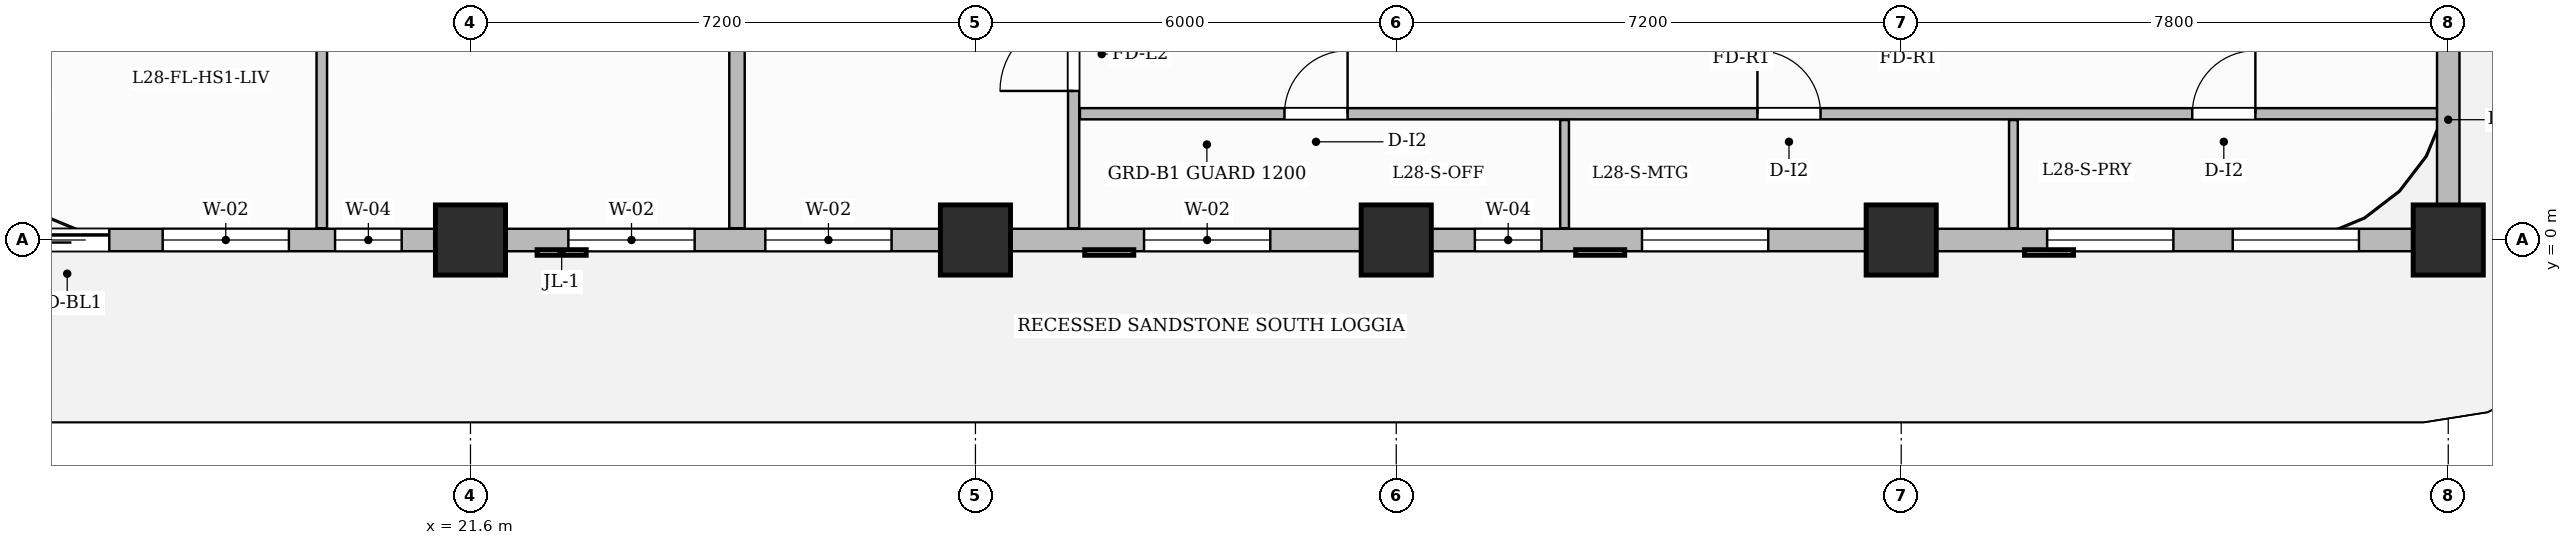
"""IFC4 building model, lengths in metres.
Left out: names, types, materials, properties, quantities, classifications, styles, units other than length and angle.
Written with IfcOpenShell. Run it as: python <this file> out.ifc"""

import sys

from ifc_helpers import new_model, si_unit, direction, frame, frame_2d, origin, origin_2d, place, context, subcontext, project, spatial, rectangle, extrude, source, transform, mapped, element, fill, save


model = new_model("IFC4")
c1 = context("Model", 3, precision=1e-05, world=origin(), true_north=direction((0.0, 1.0)))
c2 = subcontext(c1, "Body", "Model", "MODEL_VIEW")
j1 = project(units=[si_unit("LENGTHUNIT", "METRE"), si_unit("PLANEANGLEUNIT", "RADIAN")], contexts=[c1])
p1 = place(None, origin())
s1 = spatial("IfcSite", under=j1, at=p1, CompositionType="ELEMENT")
p2 = place(p1, origin())
s2 = spatial("IfcBuilding", under=s1, at=p2, CompositionType="ELEMENT")
p3 = place(p2, frame((0.0, 0.0, 115.5)))
s3 = spatial("IfcBuildingStorey", under=s2, at=p3, CompositionType="ELEMENT", Elevation=115.5)
m1 = source(origin(), c2, "Body", "SweptSolid", [
    extrude(rectangle(XDim=1.0, YDim=1.0, at=origin_2d()), origin(), (0.0, 0.0, 1.0), 3.7),
])
for number, where, z_axis, x_axis in (
    (1, (21.6, 0.0, 0.0), (0.0, 0.0, 1.0), (1.0, 0.0, 0.0)),
    (2, (28.8, 0.0, 0.0), (0.0, 0.0, 1.0), (1.0, 0.0, 0.0)),
    (3, (34.8, 0.0, 0.0), (0.0, 0.0, 1.0), (1.0, 0.0, 0.0)),
    (4, (42.0, 0.0, 0.0), (0.0, 0.0, 1.0), (1.0, 0.0, 0.0)),
    (5, (49.8, 0.0, 0.0), (0.0, 0.0, 1.0), (1.0, 0.0, 0.0)),
):
    element("IfcColumn", number, at=place(p3, frame(where, z_axis=z_axis, x_axis=x_axis)), inside=s3, PredefinedType="COLUMN", context=c2, shape_type="MappedRepresentation", body=[
        mapped(m1, transform((0.0, 0.0, 0.0), scale=1.0)),
    ])
p4 = place(p3, frame((30.2, 0.168, 0.0), z_axis=(0.0, 0.0, 1.0), x_axis=(0.0, 1.0, 0.0)))
e6 = element("IfcWall", 6, at=p4, inside=s3, PredefinedType="PARTITIONING", context=c2, shape_type="SweptSolid", body=[
    extrude(rectangle(XDim=9.492, YDim=0.16, at=frame_2d((4.746, 0.0))), origin(), (0.0, 0.0, 1.0), 3.45),
])
p5 = place(p4, frame((1.957, 0.0, 0.0)))
e7 = element("IfcOpeningElement", 7, at=p5, cuts=e6, PredefinedType="OPENING", context=c2, shape_type="SweptSolid", body=[
    extrude(rectangle(XDim=1.05, YDim=2.15, at=frame_2d((0.525, 1.075))), frame((0.0, 0.09, 0.0), z_axis=(0.0, -1.0, 0.0), x_axis=(1.0, 0.0, 0.0)), (0.0, 0.0, 1.0), 0.18),
])
p6 = place(p3, frame((30.29, 1.8, 0.0), z_axis=(0.0, 0.0, 1.0), x_axis=(1.0, 0.0, 0.0)))
e8 = element("IfcWall", 8, at=p6, inside=s3, PredefinedType="PARTITIONING", context=c2, shape_type="SweptSolid", body=[
    extrude(rectangle(XDim=19.37, YDim=0.16, at=frame_2d((9.685, 0.0))), origin(), (0.0, 0.0, 1.0), 3.45),
])
p7 = place(p6, frame((2.916, 0.0, 0.0)))
e9 = element("IfcOpeningElement", 9, at=p7, cuts=e8, PredefinedType="OPENING", context=c2, shape_type="SweptSolid", body=[
    extrude(rectangle(XDim=0.9, YDim=2.15, at=frame_2d((0.45, 1.075))), frame((0.0, 0.09, 0.0), z_axis=(0.0, -1.0, 0.0), x_axis=(1.0, 0.0, 0.0)), (0.0, 0.0, 1.0), 0.18),
])
p8 = place(p6, frame((9.66, 0.0, 0.0)))
e10 = element("IfcOpeningElement", 10, at=p8, cuts=e8, PredefinedType="OPENING", context=c2, shape_type="SweptSolid", body=[
    extrude(rectangle(XDim=0.9, YDim=2.15, at=frame_2d((0.45, 1.075))), frame((0.0, 0.09, 0.0), z_axis=(0.0, -1.0, 0.0), x_axis=(1.0, 0.0, 0.0)), (0.0, 0.0, 1.0), 0.18),
])
p9 = place(p6, frame((15.86, 0.0, 0.0)))
e11 = element("IfcOpeningElement", 11, at=p9, cuts=e8, PredefinedType="OPENING", context=c2, shape_type="SweptSolid", body=[
    extrude(rectangle(XDim=0.9, YDim=2.15, at=frame_2d((0.45, 1.075))), frame((0.0, 0.09, 0.0), z_axis=(0.0, -1.0, 0.0), x_axis=(1.0, 0.0, 0.0)), (0.0, 0.0, 1.0), 0.18),
])
for number, where, z_axis, x_axis in (
    (12, (37.2, 0.168, 0.0), (0.0, 0.0, 1.0), (0.0, 1.0, 0.0)),
    (13, (43.6, 0.168, 0.0), (0.0, 0.0, 1.0), (0.0, 1.0, 0.0)),
):
    element("IfcWall", number, at=place(p3, frame(where, z_axis=z_axis, x_axis=x_axis)), inside=s3, PredefinedType="PARTITIONING", context=c2, shape_type="SweptSolid", body=[
        extrude(rectangle(XDim=1.542, YDim=0.125, at=frame_2d((0.771, 0.0))), origin(), (0.0, 0.0, 1.0), 3.45),
    ])
p10 = place(p3, frame((25.4, 0.168, 0.0), z_axis=(0.0, 0.0, 1.0), x_axis=(0.0, 1.0, 0.0)))
e14 = element("IfcWall", 14, at=p10, inside=s3, PredefinedType="PARTITIONING", context=c2, shape_type="SweptSolid", body=[
    extrude(rectangle(XDim=9.492, YDim=0.22, at=frame_2d((4.746, 0.0))), origin(), (0.0, 0.0, 1.0), 3.105),
])
p11 = place(p3, frame((19.48, 0.168, 0.0), z_axis=(0.0, 0.0, 1.0), x_axis=(0.0, 1.0, 0.0)))
e15 = element("IfcWall", 15, at=p11, inside=s3, PredefinedType="PARTITIONING", context=c2, shape_type="SweptSolid", body=[
    extrude(rectangle(XDim=9.492, YDim=0.15, at=frame_2d((4.746, 0.0))), origin(), (0.0, 0.0, 1.0), 3.45),
])
p12 = place(p11, frame((8.057, 0.0, 0.0)))
e16 = element("IfcOpeningElement", 16, at=p12, cuts=e15, PredefinedType="OPENING", context=c2, shape_type="SweptSolid", body=[
    extrude(rectangle(XDim=0.9, YDim=2.15, at=frame_2d((0.45, 1.075))), frame((0.0, 0.085, 0.0), z_axis=(0.0, -1.0, 0.0), x_axis=(1.0, 0.0, 0.0)), (0.0, 0.0, 1.0), 0.17),
])
p13 = place(p3, frame((14.4, 0.0, 0.0), z_axis=(0.0, 0.0, 1.0), x_axis=(1.0, 0.0, 0.0)))
e17 = element("IfcWall", 17, at=p13, inside=s3, PredefinedType="SOLIDWALL", context=c2, shape_type="SweptSolid", body=[
    extrude(rectangle(XDim=35.4, YDim=0.32, at=frame_2d((17.7, 0.0))), origin(), (0.0, 0.0, 1.0), 2.935),
])
p14 = place(p13, frame((0.85, 0.0, 0.0)))
e18 = element("IfcOpeningElement", 18, at=p14, cuts=e17, PredefinedType="OPENING", context=c2, shape_type="SweptSolid", body=[
    extrude(rectangle(XDim=1.2, YDim=2.2, at=frame_2d((0.6, 1.1))), frame((0.0, 0.17, 0.0), z_axis=(0.0, -1.0, 0.0), x_axis=(1.0, 0.0, 0.0)), (0.0, 0.0, 1.0), 0.34),
])
p15 = place(p13, frame((2.811, 0.0, 0.8)))
e19 = element("IfcOpeningElement", 19, at=p15, cuts=e17, PredefinedType="OPENING", context=c2, shape_type="SweptSolid", body=[
    extrude(rectangle(XDim=1.8, YDim=1.85, at=frame_2d((0.9, 0.925))), frame((0.0, 0.17, 0.0), z_axis=(0.0, -1.0, 0.0), x_axis=(1.0, 0.0, 0.0)), (0.0, 0.0, 1.0), 0.34),
])
p16 = place(p13, frame((5.269, 0.0, 0.8)))
e20 = element("IfcOpeningElement", 20, at=p16, cuts=e17, PredefinedType="OPENING", context=c2, shape_type="SweptSolid", body=[
    extrude(rectangle(XDim=0.95, YDim=1.75, at=frame_2d((0.475, 0.875))), frame((0.0, 0.17, 0.0), z_axis=(0.0, -1.0, 0.0), x_axis=(1.0, 0.0, 0.0)), (0.0, 0.0, 1.0), 0.34),
])
p17 = place(p13, frame((8.596, 0.0, 0.8)))
e21 = element("IfcOpeningElement", 21, at=p17, cuts=e17, PredefinedType="OPENING", context=c2, shape_type="SweptSolid", body=[
    extrude(rectangle(XDim=1.8, YDim=1.85, at=frame_2d((0.9, 0.925))), frame((0.0, 0.17, 0.0), z_axis=(0.0, -1.0, 0.0), x_axis=(1.0, 0.0, 0.0)), (0.0, 0.0, 1.0), 0.34),
])
p18 = place(p13, frame((11.404, 0.0, 0.8)))
e22 = element("IfcOpeningElement", 22, at=p18, cuts=e17, PredefinedType="OPENING", context=c2, shape_type="SweptSolid", body=[
    extrude(rectangle(XDim=1.8, YDim=1.85, at=frame_2d((0.9, 0.925))), frame((0.0, 0.17, 0.0), z_axis=(0.0, -1.0, 0.0), x_axis=(1.0, 0.0, 0.0)), (0.0, 0.0, 1.0), 0.34),
])
p19 = place(p13, frame((16.804, 0.0, 0.8)))
e23 = element("IfcOpeningElement", 23, at=p19, cuts=e17, PredefinedType="OPENING", context=c2, shape_type="SweptSolid", body=[
    extrude(rectangle(XDim=1.8, YDim=1.85, at=frame_2d((0.9, 0.925))), frame((0.0, 0.17, 0.0), z_axis=(0.0, -1.0, 0.0), x_axis=(1.0, 0.0, 0.0)), (0.0, 0.0, 1.0), 0.34),
])
p20 = place(p13, frame((21.521, 0.0, 0.8)))
e24 = element("IfcOpeningElement", 24, at=p20, cuts=e17, PredefinedType="OPENING", context=c2, shape_type="SweptSolid", body=[
    extrude(rectangle(XDim=0.95, YDim=1.75, at=frame_2d((0.475, 0.875))), frame((0.0, 0.17, 0.0), z_axis=(0.0, -1.0, 0.0), x_axis=(1.0, 0.0, 0.0)), (0.0, 0.0, 1.0), 0.34),
])
p21 = place(p13, frame((23.904, 0.0, 0.8)))
e25 = element("IfcOpeningElement", 25, at=p21, cuts=e17, PredefinedType="OPENING", context=c2, shape_type="SweptSolid", body=[
    extrude(rectangle(XDim=1.8, YDim=1.85, at=frame_2d((0.9, 0.925))), frame((0.0, 0.17, 0.0), z_axis=(0.0, -1.0, 0.0), x_axis=(1.0, 0.0, 0.0)), (0.0, 0.0, 1.0), 0.34),
])
p22 = place(p13, frame((29.681, 0.0, 0.8)))
e26 = element("IfcOpeningElement", 26, at=p22, cuts=e17, PredefinedType="OPENING", context=c2, shape_type="SweptSolid", body=[
    extrude(rectangle(XDim=1.8, YDim=1.85, at=frame_2d((0.9, 0.925))), frame((0.0, 0.17, 0.0), z_axis=(0.0, -1.0, 0.0), x_axis=(1.0, 0.0, 0.0)), (0.0, 0.0, 1.0), 0.34),
])
p23 = place(p13, frame((32.327, 0.0, 0.8)))
e27 = element("IfcOpeningElement", 27, at=p23, cuts=e17, PredefinedType="OPENING", context=c2, shape_type="SweptSolid", body=[
    extrude(rectangle(XDim=1.8, YDim=1.85, at=frame_2d((0.9, 0.925))), frame((0.0, 0.17, 0.0), z_axis=(0.0, -1.0, 0.0), x_axis=(1.0, 0.0, 0.0)), (0.0, 0.0, 1.0), 0.34),
])
p24 = place(p3, frame((49.8, 0.05, 0.0), z_axis=(0.0, 0.0, 1.0), x_axis=(0.0, 1.0, 0.0)))
e28 = element("IfcWall", 28, at=p24, inside=s3, PredefinedType="SOLIDWALL", context=c2, shape_type="SweptSolid", body=[
    extrude(rectangle(XDim=3.33, YDim=0.32, at=frame_2d((1.665, 0.0))), origin(), (0.0, 0.0, 1.0), 3.45),
])
m2 = source(origin(), c2, "Body", "SweptSolid", [
    extrude(rectangle(XDim=1.05, YDim=2.15, at=frame_2d((0.525, 1.075))), frame((0.0, 0.025, 0.0), z_axis=(0.0, -1.0, 0.0), x_axis=(1.0, 0.0, 0.0)), (0.0, 0.0, 1.0), 0.05),
])
p25 = place(p5, origin())
e29 = element("IfcDoor", 29, at=p25, inside=s3, OperationType="SINGLE_SWING_LEFT", PredefinedType="DOOR", context=c2, shape_type="MappedRepresentation", body=[
    mapped(m2, transform((0.0, 0.0, 0.0), scale=1.0)),
])
fill(e7, e29)
m3 = source(origin(), c2, "Body", "SweptSolid", [
    extrude(rectangle(XDim=0.9, YDim=2.15, at=frame_2d((0.45, 1.075))), frame((0.0, 0.025, 0.0), z_axis=(0.0, -1.0, 0.0), x_axis=(1.0, 0.0, 0.0)), (0.0, 0.0, 1.0), 0.05),
])
p26 = place(p7, origin())
e30 = element("IfcDoor", 30, at=p26, inside=s3, OperationType="SINGLE_SWING_RIGHT", PredefinedType="DOOR", context=c2, shape_type="MappedRepresentation", body=[
    mapped(m3, transform((0.0, 0.0, 0.0), scale=1.0)),
])
fill(e9, e30)
p27 = place(p8, origin())
e31 = element("IfcDoor", 31, at=p27, inside=s3, OperationType="SINGLE_SWING_LEFT", PredefinedType="DOOR", context=c2, shape_type="MappedRepresentation", body=[
    mapped(m3, transform((0.0, 0.0, 0.0), scale=1.0)),
])
fill(e10, e31)
p28 = place(p9, origin())
e32 = element("IfcDoor", 32, at=p28, inside=s3, OperationType="SINGLE_SWING_RIGHT", PredefinedType="DOOR", context=c2, shape_type="MappedRepresentation", body=[
    mapped(m3, transform((0.0, 0.0, 0.0), scale=1.0)),
])
fill(e11, e32)
m4 = source(origin(), c2, "Body", "SweptSolid", [
    extrude(rectangle(XDim=1.2, YDim=2.2, at=frame_2d((0.6, 1.1))), frame((0.0, 0.025, 0.0), z_axis=(0.0, -1.0, 0.0), x_axis=(1.0, 0.0, 0.0)), (0.0, 0.0, 1.0), 0.05),
])
p29 = place(p14, origin())
e33 = element("IfcDoor", 33, at=p29, inside=s3, OperationType="SLIDING_TO_LEFT", PredefinedType="DOOR", context=c2, shape_type="MappedRepresentation", body=[
    mapped(m4, transform((0.0, 0.0, 0.0), scale=1.0)),
])
fill(e18, e33)
m5 = source(origin(), c2, "Body", "SweptSolid", [
    extrude(rectangle(XDim=1.8, YDim=1.85, at=frame_2d((0.9, 0.925))), frame((0.0, 0.03, 0.0), z_axis=(0.0, -1.0, 0.0), x_axis=(1.0, 0.0, 0.0)), (0.0, 0.0, 1.0), 0.06),
])
p30 = place(p15, origin())
e34 = element("IfcWindow", 34, at=p30, inside=s3, PartitioningType="DOUBLE_PANEL_VERTICAL", PredefinedType="WINDOW", context=c2, shape_type="MappedRepresentation", body=[
    mapped(m5, transform((0.0, 0.0, 0.0), scale=1.0)),
])
fill(e19, e34)
m6 = source(origin(), c2, "Body", "SweptSolid", [
    extrude(rectangle(XDim=0.95, YDim=1.75, at=frame_2d((0.475, 0.875))), frame((0.0, 0.03, 0.0), z_axis=(0.0, -1.0, 0.0), x_axis=(1.0, 0.0, 0.0)), (0.0, 0.0, 1.0), 0.06),
])
p31 = place(p16, origin())
e35 = element("IfcWindow", 35, at=p31, inside=s3, PartitioningType="SINGLE_PANEL", PredefinedType="WINDOW", context=c2, shape_type="MappedRepresentation", body=[
    mapped(m6, transform((0.0, 0.0, 0.0), scale=1.0)),
])
fill(e20, e35)
p32 = place(p17, origin())
e36 = element("IfcWindow", 36, at=p32, inside=s3, PartitioningType="DOUBLE_PANEL_VERTICAL", PredefinedType="WINDOW", context=c2, shape_type="MappedRepresentation", body=[
    mapped(m5, transform((0.0, 0.0, 0.0), scale=1.0)),
])
fill(e21, e36)
p33 = place(p18, origin())
e37 = element("IfcWindow", 37, at=p33, inside=s3, PartitioningType="DOUBLE_PANEL_VERTICAL", PredefinedType="WINDOW", context=c2, shape_type="MappedRepresentation", body=[
    mapped(m5, transform((0.0, 0.0, 0.0), scale=1.0)),
])
fill(e22, e37)
p34 = place(p19, origin())
e38 = element("IfcWindow", 38, at=p34, inside=s3, PartitioningType="DOUBLE_PANEL_VERTICAL", PredefinedType="WINDOW", context=c2, shape_type="MappedRepresentation", body=[
    mapped(m5, transform((0.0, 0.0, 0.0), scale=1.0)),
])
fill(e23, e38)
p35 = place(p20, origin())
e39 = element("IfcWindow", 39, at=p35, inside=s3, PartitioningType="SINGLE_PANEL", PredefinedType="WINDOW", context=c2, shape_type="MappedRepresentation", body=[
    mapped(m6, transform((0.0, 0.0, 0.0), scale=1.0)),
])
fill(e24, e39)
p36 = place(p21, origin())
e40 = element("IfcWindow", 40, at=p36, inside=s3, PartitioningType="DOUBLE_PANEL_VERTICAL", PredefinedType="WINDOW", context=c2, shape_type="MappedRepresentation", body=[
    mapped(m5, transform((0.0, 0.0, 0.0), scale=1.0)),
])
fill(e25, e40)
p37 = place(p22, origin())
e41 = element("IfcWindow", 41, at=p37, inside=s3, PartitioningType="DOUBLE_PANEL_VERTICAL", PredefinedType="WINDOW", context=c2, shape_type="MappedRepresentation", body=[
    mapped(m5, transform((0.0, 0.0, 0.0), scale=1.0)),
])
fill(e26, e41)
p38 = place(p23, origin())
e42 = element("IfcWindow", 42, at=p38, inside=s3, PartitioningType="DOUBLE_PANEL_VERTICAL", PredefinedType="WINDOW", context=c2, shape_type="MappedRepresentation", body=[
    mapped(m5, transform((0.0, 0.0, 0.0), scale=1.0)),
])
fill(e27, e42)
save(model, sys.argv[1])
